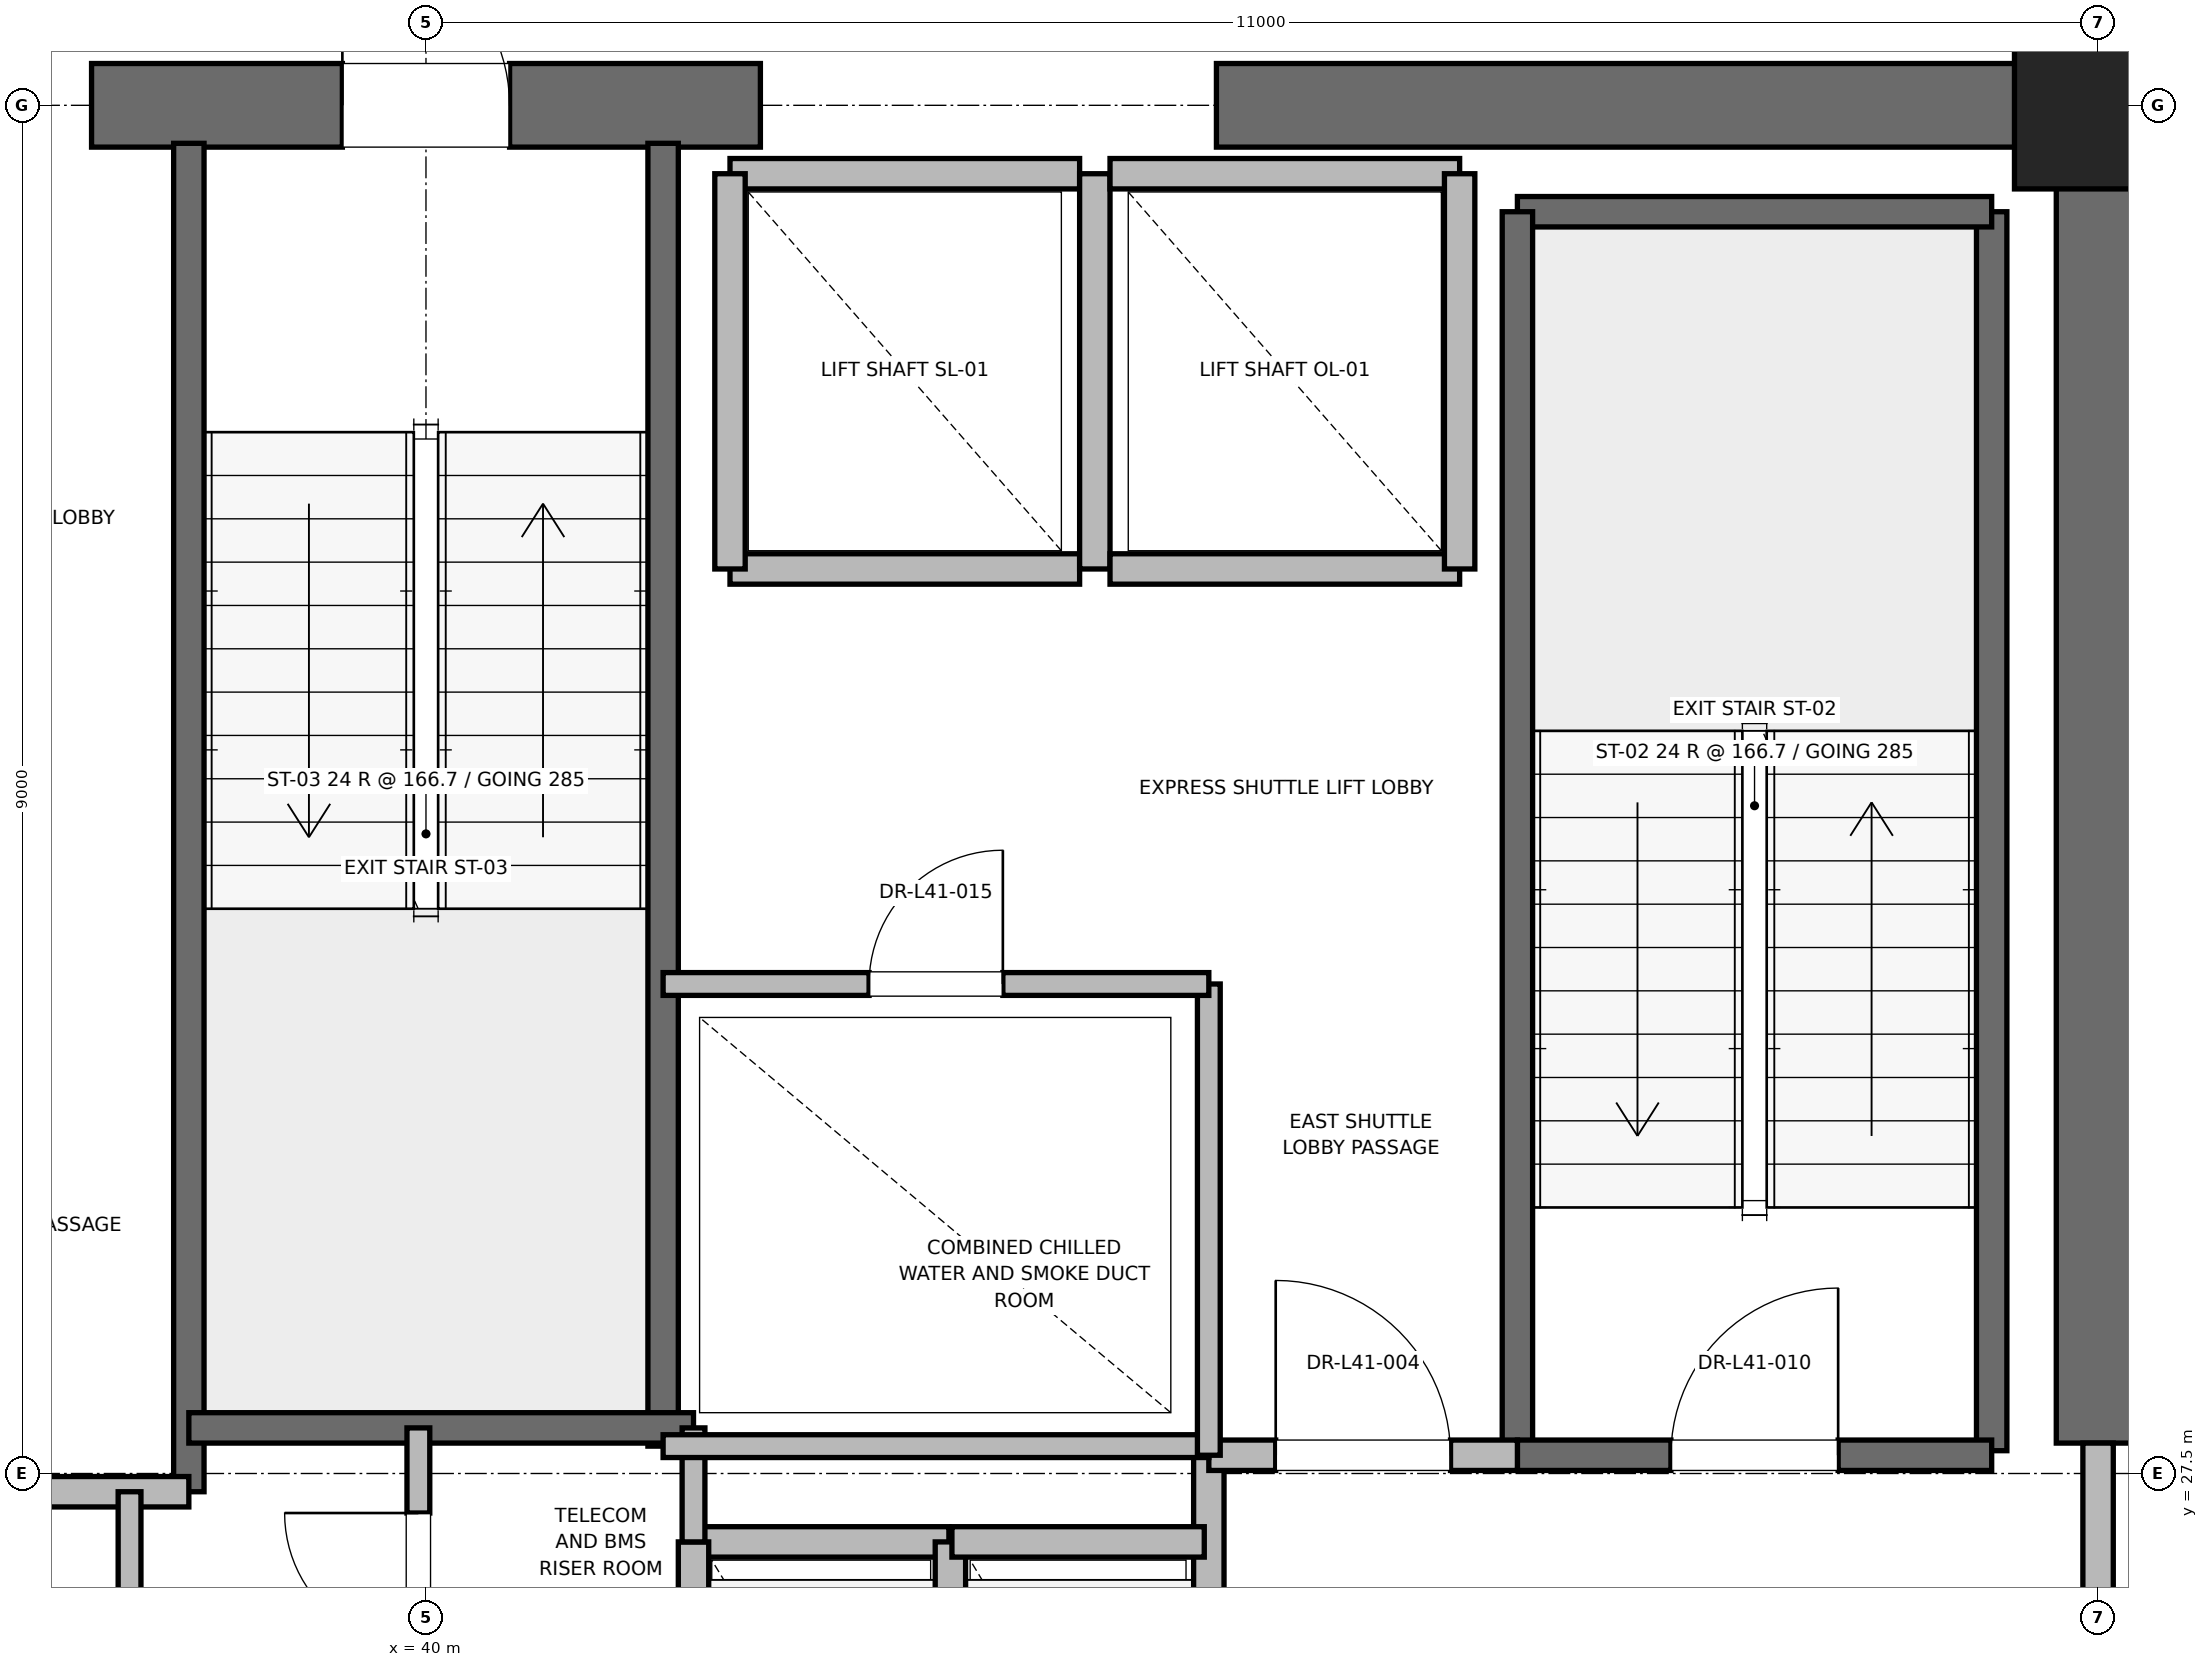
"""IFC4 building model, lengths in metres.
Left out: names, types, materials, properties, quantities, classifications, styles, units other than length and angle.
Written with IfcOpenShell. Run it as: python <this file> out.ifc"""

import sys

from ifc_helpers import new_model, si_unit, direction, frame, frame_2d, origin, origin_2d, place, context, subcontext, project, spatial, rectangle, extrude, element, fill, save


model = new_model("IFC4")
c1 = context("Model", 3, precision=1e-05, world=origin(), true_north=direction((0.0, 1.0)))
c2 = subcontext(c1, "Body", "Model", "MODEL_VIEW")
j1 = project(units=[si_unit("LENGTHUNIT", "METRE"), si_unit("PLANEANGLEUNIT", "RADIAN")], contexts=[c1])
p1 = place(None, origin())
s1 = spatial("IfcSite", under=j1, at=p1, CompositionType="ELEMENT")
p2 = place(p1, origin())
s2 = spatial("IfcBuilding", under=s1, at=p2, CompositionType="ELEMENT")
p3 = place(p2, frame((0.0, 0.0, 176.4)))
s3 = spatial("IfcBuildingStorey", under=s2, at=p3, CompositionType="ELEMENT", Elevation=176.4)
p4 = place(p3, frame((51.0, 36.5, 0.0), z_axis=(0.0, 0.0, 1.0), x_axis=(1.0, 0.0, 0.0)))
e1 = element("IfcColumn", 1, at=p4, inside=s3, PredefinedType="PILASTER", context=c2, shape_type="SweptSolid", body=[
    extrude(rectangle(XDim=1.1, YDim=1.1, at=origin_2d()), origin(), (0.0, 0.0, 1.0), 4.0),
])
p5 = place(p3, frame((37.8, 36.5, 0.0), z_axis=(0.0, 0.0, 1.0), x_axis=(1.0, 0.0, 0.0)))
e2 = element("IfcWall", 2, at=p5, inside=s3, PredefinedType="SHEAR", context=c2, shape_type="SweptSolid", body=[
    extrude(rectangle(XDim=4.4, YDim=0.55, at=frame_2d((2.2, 0.0))), origin(), (0.0, 0.0, 1.0), 3.775),
])
p6 = place(p5, frame((1.65, 0.0, 0.0)))
e3 = element("IfcOpeningElement", 3, at=p6, cuts=e2, PredefinedType="OPENING", context=c2, shape_type="SweptSolid", body=[
    extrude(rectangle(XDim=1.1, YDim=2.15, at=frame_2d((0.55, 1.075))), frame((0.0, 0.275, 0.0), z_axis=(0.0, -1.0, 0.0), x_axis=(1.0, 0.0, 0.0)), (0.0, 0.0, 1.0), 0.55),
])
p7 = place(p3, frame((45.2, 36.5, 0.0), z_axis=(0.0, 0.0, 1.0), x_axis=(1.0, 0.0, 0.0)))
e4 = element("IfcWall", 4, at=p7, inside=s3, PredefinedType="SHEAR", context=c2, shape_type="SweptSolid", body=[
    extrude(rectangle(XDim=5.8, YDim=0.55, at=frame_2d((2.9, 0.0))), origin(), (0.0, 0.0, 1.0), 3.775),
])
p8 = place(p3, frame((51.0, 27.7, 0.0), z_axis=(0.0, 0.0, 1.0), x_axis=(0.0, 1.0, 0.0)))
e5 = element("IfcWall", 5, at=p8, inside=s3, PredefinedType="SHEAR", context=c2, shape_type="SweptSolid", body=[
    extrude(rectangle(XDim=8.8, YDim=0.55, at=frame_2d((4.4, 0.0))), origin(), (0.0, 0.0, 1.0), 3.775),
])
p9 = place(p3, frame((50.3, 27.65, 0.0), z_axis=(0.0, 0.0, 1.0), x_axis=(0.0, 1.0, 0.0)))
e6 = element("IfcWall", 6, at=p9, inside=s3, PredefinedType="SOLIDWALL", context=c2, shape_type="SweptSolid", body=[
    extrude(rectangle(XDim=8.15, YDim=0.2, at=frame_2d((4.075, 0.0))), origin(), (0.0, 0.0, 1.0), 3.775),
])
p10 = place(p3, frame((47.18, 35.8, 0.0), z_axis=(0.0, 0.0, 1.0), x_axis=(1.0, 0.0, 0.0)))
e7 = element("IfcWall", 7, at=p10, inside=s3, PredefinedType="SOLIDWALL", context=c2, shape_type="SweptSolid", body=[
    extrude(rectangle(XDim=3.12, YDim=0.2, at=frame_2d((1.56, 0.0))), origin(), (0.0, 0.0, 1.0), 3.775),
])
p11 = place(p3, frame((47.18, 27.62, 0.0), z_axis=(0.0, 0.0, 1.0), x_axis=(0.0, 1.0, 0.0)))
e8 = element("IfcWall", 8, at=p11, inside=s3, PredefinedType="SOLIDWALL", context=c2, shape_type="SweptSolid", body=[
    extrude(rectangle(XDim=8.18, YDim=0.2, at=frame_2d((4.09, 0.0))), origin(), (0.0, 0.0, 1.0), 3.775),
])
p12 = place(p3, frame((47.18, 27.62, 0.0), z_axis=(0.0, 0.0, 1.0), x_axis=(1.0, 0.0, 0.0)))
e9 = element("IfcWall", 9, at=p12, inside=s3, PredefinedType="SOLIDWALL", context=c2, shape_type="SweptSolid", body=[
    extrude(rectangle(XDim=3.12, YDim=0.2, at=frame_2d((1.56, 0.0))), origin(), (0.0, 0.0, 1.0), 3.775),
])
p13 = place(p12, frame((1.01, 0.0, 0.0)))
e10 = element("IfcOpeningElement", 10, at=p13, cuts=e9, PredefinedType="OPENING", context=c2, shape_type="SweptSolid", body=[
    extrude(rectangle(XDim=1.1, YDim=2.15, at=frame_2d((0.55, 1.075))), frame((0.0, 0.1, 0.0), z_axis=(0.0, -1.0, 0.0), x_axis=(1.0, 0.0, 0.0)), (0.0, 0.0, 1.0), 0.2),
])
p14 = place(p3, frame((38.44, 27.38, 0.0), z_axis=(0.0, 0.0, 1.0), x_axis=(0.0, 1.0, 0.0)))
e11 = element("IfcWall", 11, at=p14, inside=s3, PredefinedType="SOLIDWALL", context=c2, shape_type="SweptSolid", body=[
    extrude(rectangle(XDim=8.87, YDim=0.2, at=frame_2d((4.435, 0.0))), origin(), (0.0, 0.0, 1.0), 3.775),
])
p15 = place(p3, frame((41.56, 27.68, 0.0), z_axis=(0.0, 0.0, 1.0), x_axis=(0.0, 1.0, 0.0)))
e12 = element("IfcWall", 12, at=p15, inside=s3, PredefinedType="SOLIDWALL", context=c2, shape_type="SweptSolid", body=[
    extrude(rectangle(XDim=8.57, YDim=0.2, at=frame_2d((4.285, 0.0))), origin(), (0.0, 0.0, 1.0), 3.775),
])
p16 = place(p3, frame((38.44, 27.8, 0.0), z_axis=(0.0, 0.0, 1.0), x_axis=(1.0, 0.0, 0.0)))
e13 = element("IfcWall", 13, at=p16, inside=s3, PredefinedType="SOLIDWALL", context=c2, shape_type="SweptSolid", body=[
    extrude(rectangle(XDim=3.32, YDim=0.2, at=frame_2d((1.66, 0.0))), origin(), (0.0, 0.0, 1.0), 3.775),
])
p17 = place(p3, frame((32.82, 27.38, 0.0), z_axis=(0.0, 0.0, 1.0), x_axis=(1.0, 0.0, 0.0)))
e14 = element("IfcWall", 14, at=p17, inside=s3, PredefinedType="PARTITIONING", context=c2, shape_type="SweptSolid", body=[
    extrude(rectangle(XDim=5.62, YDim=0.2, at=frame_2d((2.81, 0.0))), origin(), (0.0, 0.0, 1.0), 3.775),
])
p18 = place(p3, frame((45.15, 24.25, 0.0), z_axis=(0.0, 0.0, 1.0), x_axis=(0.0, 1.0, 0.0)))
e15 = element("IfcWall", 15, at=p18, inside=s3, PredefinedType="PARTITIONING", context=c2, shape_type="SweptSolid", body=[
    extrude(rectangle(XDim=3.37, YDim=0.2, at=frame_2d((1.685, 0.0))), origin(), (0.0, 0.0, 1.0), 3.775),
])
p19 = place(p3, frame((45.15, 27.62, 0.0), z_axis=(0.0, 0.0, 1.0), x_axis=(1.0, 0.0, 0.0)))
e16 = element("IfcWall", 16, at=p19, inside=s3, PredefinedType="PARTITIONING", context=c2, shape_type="SweptSolid", body=[
    extrude(rectangle(XDim=2.03, YDim=0.2, at=frame_2d((1.015, 0.0))), origin(), (0.0, 0.0, 1.0), 3.775),
])
p20 = place(p19, frame((0.44, 0.0, 0.0)))
e17 = element("IfcOpeningElement", 17, at=p20, cuts=e16, PredefinedType="OPENING", context=c2, shape_type="SweptSolid", body=[
    extrude(rectangle(XDim=1.15, YDim=2.2, at=frame_2d((0.575, 1.1))), frame((0.0, 0.1, 0.0), z_axis=(0.0, -1.0, 0.0), x_axis=(1.0, 0.0, 0.0)), (0.0, 0.0, 1.0), 0.2),
])
p21 = place(p3, frame((51.0, 24.3, 0.0), z_axis=(0.0, 0.0, 1.0), x_axis=(0.0, 1.0, 0.0)))
e18 = element("IfcWall", 18, at=p21, inside=s3, PredefinedType="PARTITIONING", context=c2, shape_type="SweptSolid", body=[
    extrude(rectangle(XDim=3.4, YDim=0.2, at=frame_2d((1.7, 0.0))), origin(), (0.0, 0.0, 1.0), 2.755),
])
p22 = place(p21, frame((1.125, 0.0, 0.0)))
e19 = element("IfcOpeningElement", 19, at=p22, cuts=e18, PredefinedType="OPENING", context=c2, shape_type="SweptSolid", body=[
    extrude(rectangle(XDim=1.15, YDim=2.2, at=frame_2d((0.575, 1.1))), frame((0.0, 0.1, 0.0), z_axis=(0.0, -1.0, 0.0), x_axis=(1.0, 0.0, 0.0)), (0.0, 0.0, 1.0), 0.2),
])
p23 = place(p3, frame((43.44, 27.05, 0.0), z_axis=(0.0, 0.0, 1.0), x_axis=(-1.0, 0.0, 0.0)))
e20 = element("IfcWall", 20, at=p23, inside=s3, PredefinedType="SOLIDWALL", context=c2, shape_type="SweptSolid", body=[
    extrude(rectangle(XDim=1.68, YDim=0.2, at=frame_2d((0.84, 0.0))), origin(), (0.0, 0.0, 1.0), 3.775),
])
for number, where, z_axis, x_axis in (
    (21, (41.76, 27.05, 0.0), (0.0, 0.0, 1.0), (0.0, -1.0, 0.0)),
    (22, (43.45, 24.45, 0.0), (0.0, 0.0, 1.0), (0.0, 1.0, 0.0)),
):
    element("IfcWall", number, at=place(p3, frame(where, z_axis=z_axis, x_axis=x_axis)), inside=s3, PredefinedType="SOLIDWALL", context=c2, shape_type="SweptSolid", body=[
        extrude(rectangle(XDim=2.6, YDim=0.2, at=frame_2d((1.3, 0.0))), origin(), (0.0, 0.0, 1.0), 3.775),
    ])
p24 = place(p3, frame((45.12, 27.05, 0.0), z_axis=(0.0, 0.0, 1.0), x_axis=(-1.0, 0.0, 0.0)))
e23 = element("IfcWall", 23, at=p24, inside=s3, PredefinedType="SOLIDWALL", context=c2, shape_type="SweptSolid", body=[
    extrude(rectangle(XDim=1.66, YDim=0.2, at=frame_2d((0.83, 0.0))), origin(), (0.0, 0.0, 1.0), 3.775),
])
p25 = place(p3, frame((42.0, 33.45, 0.0), z_axis=(0.0, 0.0, 1.0), x_axis=(1.0, 0.0, 0.0)))
e24 = element("IfcWall", 24, at=p25, inside=s3, PredefinedType="SOLIDWALL", context=c2, shape_type="SweptSolid", body=[
    extrude(rectangle(XDim=2.3, YDim=0.2, at=frame_2d((1.15, 0.0))), origin(), (0.0, 0.0, 1.0), 3.775),
])
p26 = place(p3, frame((44.3, 36.05, 0.0), z_axis=(0.0, 0.0, 1.0), x_axis=(-1.0, 0.0, 0.0)))
e25 = element("IfcWall", 25, at=p26, inside=s3, PredefinedType="SOLIDWALL", context=c2, shape_type="SweptSolid", body=[
    extrude(rectangle(XDim=2.3, YDim=0.2, at=frame_2d((1.15, 0.0))), origin(), (0.0, 0.0, 1.0), 2.755),
])
for number, where, z_axis, x_axis in (
    (26, (42.0, 36.05, 0.0), (0.0, 0.0, 1.0), (0.0, -1.0, 0.0)),
    (27, (44.4, 33.45, 0.0), (0.0, 0.0, 1.0), (0.0, 1.0, 0.0)),
):
    element("IfcWall", number, at=place(p3, frame(where, z_axis=z_axis, x_axis=x_axis)), inside=s3, PredefinedType="SOLIDWALL", context=c2, shape_type="SweptSolid", body=[
        extrude(rectangle(XDim=2.6, YDim=0.2, at=frame_2d((1.3, 0.0))), origin(), (0.0, 0.0, 1.0), 2.755),
    ])
p27 = place(p3, frame((44.5, 33.45, 0.0), z_axis=(0.0, 0.0, 1.0), x_axis=(1.0, 0.0, 0.0)))
e28 = element("IfcWall", 28, at=p27, inside=s3, PredefinedType="SOLIDWALL", context=c2, shape_type="SweptSolid", body=[
    extrude(rectangle(XDim=2.3, YDim=0.2, at=frame_2d((1.15, 0.0))), origin(), (0.0, 0.0, 1.0), 3.775),
])
p28 = place(p3, frame((46.8, 36.05, 0.0), z_axis=(0.0, 0.0, 1.0), x_axis=(-1.0, 0.0, 0.0)))
e29 = element("IfcWall", 29, at=p28, inside=s3, PredefinedType="SOLIDWALL", context=c2, shape_type="SweptSolid", body=[
    extrude(rectangle(XDim=2.3, YDim=0.2, at=frame_2d((1.15, 0.0))), origin(), (0.0, 0.0, 1.0), 2.755),
])
p29 = place(p3, frame((46.8, 33.45, 0.0), z_axis=(0.0, 0.0, 1.0), x_axis=(0.0, 1.0, 0.0)))
e30 = element("IfcWall", 30, at=p29, inside=s3, PredefinedType="SOLIDWALL", context=c2, shape_type="SweptSolid", body=[
    extrude(rectangle(XDim=2.6, YDim=0.2, at=frame_2d((1.3, 0.0))), origin(), (0.0, 0.0, 1.0), 3.775),
])
p30 = place(p3, frame((41.76, 27.05, 0.0), z_axis=(0.0, 0.0, 1.0), x_axis=(0.0, 1.0, 0.0)))
e31 = element("IfcWall", 31, at=p30, inside=s3, PredefinedType="PARTITIONING", context=c2, shape_type="SweptSolid", body=[
    extrude(rectangle(XDim=0.75, YDim=0.15, at=frame_2d((0.375, 0.0))), origin(), (0.0, 0.0, 1.0), 2.85),
])
p31 = place(p3, frame((39.95, 25.8, 0.0), z_axis=(0.0, 0.0, 1.0), x_axis=(0.0, 1.0, 0.0)))
e32 = element("IfcWall", 32, at=p31, inside=s3, PredefinedType="PARTITIONING", context=c2, shape_type="SweptSolid", body=[
    extrude(rectangle(XDim=2.0, YDim=0.15, at=frame_2d((1.0, 0.0))), origin(), (0.0, 0.0, 1.0), 2.85),
])
p32 = place(p31, frame((0.56, 0.0, 0.0)))
e33 = element("IfcOpeningElement", 33, at=p32, cuts=e32, PredefinedType="OPENING", context=c2, shape_type="SweptSolid", body=[
    extrude(rectangle(XDim=0.88, YDim=2.1, at=frame_2d((0.44, 1.05))), frame((0.0, 0.075, 0.0), z_axis=(0.0, -1.0, 0.0), x_axis=(1.0, 0.0, 0.0)), (0.0, 0.0, 1.0), 0.15),
])
p33 = place(p3, frame((38.05, 18.6, 0.0), z_axis=(0.0, 0.0, 1.0), x_axis=(0.0, 1.0, 0.0)))
e34 = element("IfcWall", 34, at=p33, inside=s3, PredefinedType="PARTITIONING", context=c2, shape_type="SweptSolid", body=[
    extrude(rectangle(XDim=8.78, YDim=0.15, at=frame_2d((4.39, 0.0))), origin(), (0.0, 0.0, 1.0), 2.755),
])
p34 = place(p33, frame((3.89, 0.0, 0.0)))
e35 = element("IfcOpeningElement", 35, at=p34, cuts=e34, PredefinedType="OPENING", context=c2, shape_type="SweptSolid", body=[
    extrude(rectangle(XDim=1.0, YDim=2.15, at=frame_2d((0.5, 1.075))), frame((0.0, 0.075, 0.0), z_axis=(0.0, -1.0, 0.0), x_axis=(1.0, 0.0, 0.0)), (0.0, 0.0, 1.0), 0.15),
])
p35 = place(p3, frame((41.56, 27.68, 0.0), z_axis=(0.0, 0.0, 1.0), x_axis=(1.0, 0.0, 0.0)))
e36 = element("IfcWall", 36, at=p35, inside=s3, PredefinedType="PARTITIONING", context=c2, shape_type="SweptSolid", body=[
    extrude(rectangle(XDim=3.59, YDim=0.15, at=frame_2d((1.795, 0.0))), origin(), (0.0, 0.0, 1.0), 2.85),
])
p36 = place(p3, frame((45.15, 27.62, 0.0), z_axis=(0.0, 0.0, 1.0), x_axis=(0.0, 1.0, 0.0)))
e37 = element("IfcWall", 37, at=p36, inside=s3, PredefinedType="PARTITIONING", context=c2, shape_type="SweptSolid", body=[
    extrude(rectangle(XDim=3.1, YDim=0.15, at=frame_2d((1.55, 0.0))), origin(), (0.0, 0.0, 1.0), 2.85),
])
p37 = place(p3, frame((41.56, 30.72, 0.0), z_axis=(0.0, 0.0, 1.0), x_axis=(1.0, 0.0, 0.0)))
e38 = element("IfcWall", 38, at=p37, inside=s3, PredefinedType="PARTITIONING", context=c2, shape_type="SweptSolid", body=[
    extrude(rectangle(XDim=3.59, YDim=0.15, at=frame_2d((1.795, 0.0))), origin(), (0.0, 0.0, 1.0), 2.85),
])
p38 = place(p37, frame((1.355, 0.0, 0.0)))
e39 = element("IfcOpeningElement", 39, at=p38, cuts=e38, PredefinedType="OPENING", context=c2, shape_type="SweptSolid", body=[
    extrude(rectangle(XDim=0.88, YDim=2.1, at=frame_2d((0.44, 1.05))), frame((0.0, 0.075, 0.0), z_axis=(0.0, -1.0, 0.0), x_axis=(1.0, 0.0, 0.0)), (0.0, 0.0, 1.0), 0.15),
])
p39 = place(p13, origin())
e40 = element("IfcDoor", 40, at=p39, inside=s3, OperationType="SINGLE_SWING_RIGHT", PredefinedType="DOOR", context=c2, shape_type="SweptSolid", body=[
    extrude(rectangle(XDim=1.1, YDim=2.15, at=frame_2d((0.55, 1.075))), frame((0.0, 0.025, 0.0), z_axis=(0.0, -1.0, 0.0), x_axis=(1.0, 0.0, 0.0)), (0.0, 0.0, 1.0), 0.05),
])
fill(e10, e40)
p40 = place(p6, origin())
e41 = element("IfcDoor", 41, at=p40, inside=s3, OperationType="SINGLE_SWING_LEFT", PredefinedType="DOOR", context=c2, shape_type="SweptSolid", body=[
    extrude(rectangle(XDim=1.1, YDim=2.15, at=frame_2d((0.55, 1.075))), frame((0.0, 0.025, 0.0), z_axis=(0.0, -1.0, 0.0), x_axis=(1.0, 0.0, 0.0)), (0.0, 0.0, 1.0), 0.05),
])
fill(e3, e41)
p41 = place(p20, origin())
e42 = element("IfcDoor", 42, at=p41, inside=s3, OperationType="SINGLE_SWING_LEFT", PredefinedType="DOOR", context=c2, shape_type="SweptSolid", body=[
    extrude(rectangle(XDim=1.15, YDim=2.2, at=frame_2d((0.575, 1.1))), frame((0.0, 0.025, 0.0), z_axis=(0.0, -1.0, 0.0), x_axis=(1.0, 0.0, 0.0)), (0.0, 0.0, 1.0), 0.05),
])
fill(e17, e42)
p42 = place(p32, origin())
e43 = element("IfcDoor", 43, at=p42, inside=s3, OperationType="SINGLE_SWING_RIGHT", PredefinedType="DOOR", context=c2, shape_type="SweptSolid", body=[
    extrude(rectangle(XDim=0.88, YDim=2.1, at=frame_2d((0.44, 1.05))), frame((0.0, 0.025, 0.0), z_axis=(0.0, -1.0, 0.0), x_axis=(1.0, 0.0, 0.0)), (0.0, 0.0, 1.0), 0.05),
])
fill(e33, e43)
p43 = place(p38, origin())
e44 = element("IfcDoor", 44, at=p43, inside=s3, OperationType="SINGLE_SWING_RIGHT", PredefinedType="DOOR", context=c2, shape_type="SweptSolid", body=[
    extrude(rectangle(XDim=0.88, YDim=2.1, at=frame_2d((0.44, 1.05))), frame((0.0, 0.025, 0.0), z_axis=(0.0, -1.0, 0.0), x_axis=(1.0, 0.0, 0.0)), (0.0, 0.0, 1.0), 0.05),
])
fill(e39, e44)
save(model, sys.argv[1])
